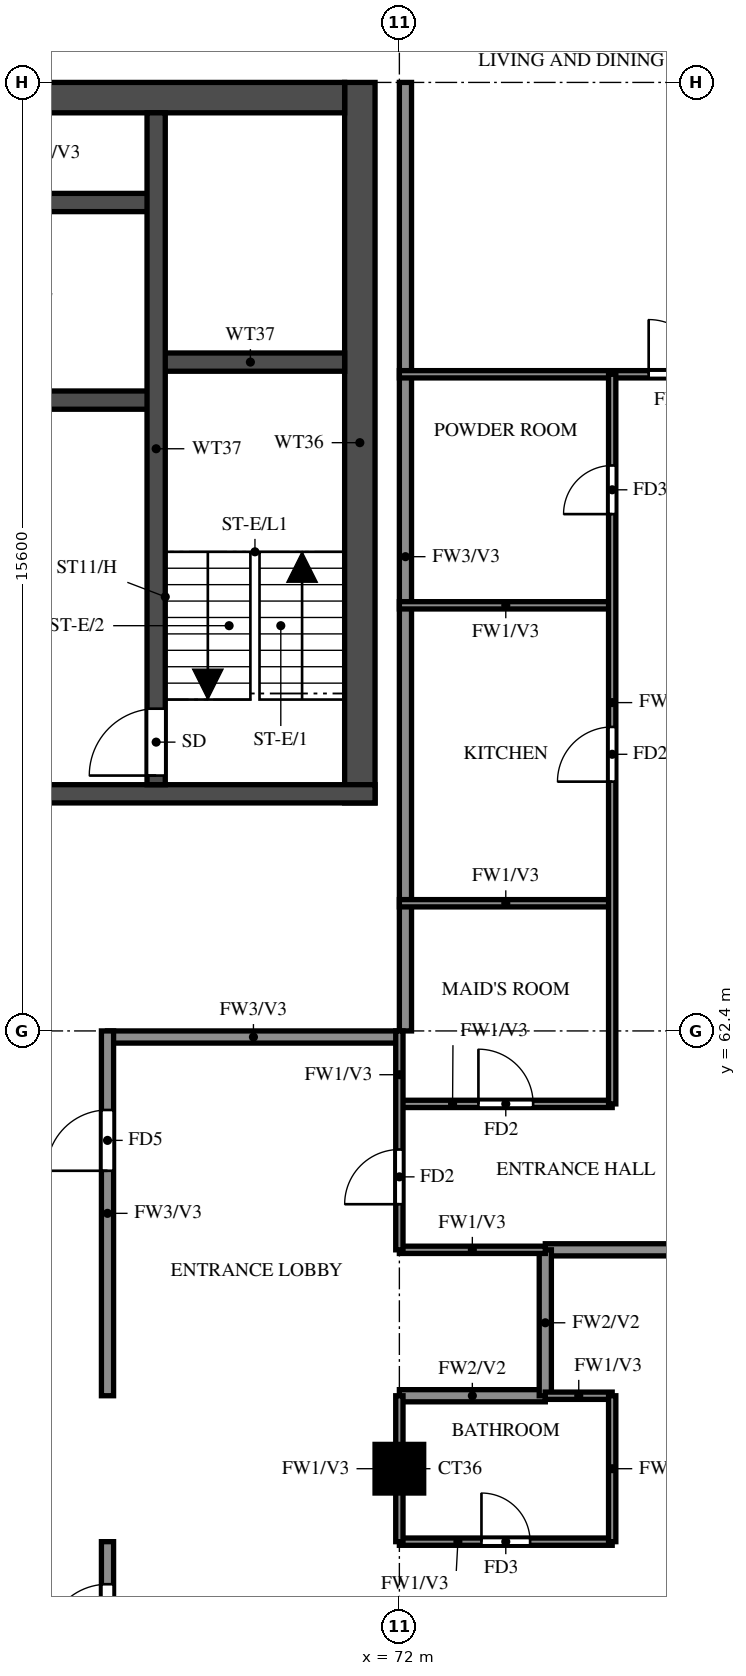
"""IFC4 building model, lengths in metres.
Left out: names, types, materials, properties, quantities, classifications, styles, units other than length and angle.
Written with IfcOpenShell. Run it as: python <this file> out.ifc"""

import sys

from ifc_helpers import new_model, si_unit, direction, frame, frame_2d, origin, origin_2d, place, context, subcontext, project, spatial, rectangle, extrude, source, transform, mapped, element, fill, save


model = new_model("IFC4")
c1 = context("Model", 3, precision=1e-05, world=origin(), true_north=direction((0.0, 1.0)))
c2 = subcontext(c1, "Body", "Model", "MODEL_VIEW")
j1 = project(units=[si_unit("LENGTHUNIT", "METRE"), si_unit("PLANEANGLEUNIT", "RADIAN")], contexts=[c1])
p1 = place(None, origin())
s1 = spatial("IfcSite", under=j1, at=p1, CompositionType="ELEMENT")
p2 = place(p1, origin())
s2 = spatial("IfcBuilding", under=s1, at=p2, CompositionType="ELEMENT")
p3 = place(p2, frame((0.0, 0.0, 243.0)))
s3 = spatial("IfcBuildingStorey", under=s2, at=p3, CompositionType="ELEMENT", Elevation=243.0)
m1 = source(origin(), c2, "Body", "SweptSolid", [
    extrude(rectangle(XDim=0.8, YDim=0.8, at=origin_2d()), origin(), (0.0, 0.0, 1.0), 3.22),
])
p4 = place(p3, frame((72.0, 55.2, 0.0), z_axis=(0.0, 0.0, 1.0), x_axis=(1.0, 0.0, 0.0)))
e1 = element("IfcColumn", 1, at=p4, inside=s3, PredefinedType="COLUMN", context=c2, shape_type="MappedRepresentation", body=[
    mapped(m1, transform((0.0, 0.0, 0.0))),
])
p5 = place(p3, frame((71.35, 66.15, 0.0), z_axis=(0.0, 0.0, 1.0), x_axis=(0.0, 1.0, 0.0)))
e2 = element("IfcWall", 2, at=p5, inside=s3, PredefinedType="SHEAR", context=c2, shape_type="SweptSolid", body=[
    extrude(rectangle(XDim=11.85, YDim=0.5, at=frame_2d((5.925, 0.0))), origin(), (0.0, 0.0, 1.0), 3.22),
])
p6 = place(p3, frame((29.7, 77.75, 0.0), z_axis=(0.0, 0.0, 1.0), x_axis=(1.0, 0.0, 0.0)))
e3 = element("IfcWall", 3, at=p6, inside=s3, PredefinedType="SHEAR", context=c2, shape_type="SweptSolid", body=[
    extrude(rectangle(XDim=41.4, YDim=0.5, at=frame_2d((20.7, 0.0))), origin(), (0.0, 0.0, 1.0), 3.22),
])
p7 = place(p3, frame((29.2, 66.3, 0.0), z_axis=(0.0, 0.0, 1.0), x_axis=(1.0, 0.0, 0.0)))
e4 = element("IfcWall", 4, at=p7, inside=s3, PredefinedType="SHEAR", context=c2, shape_type="SweptSolid", body=[
    extrude(rectangle(XDim=42.4, YDim=0.3, at=frame_2d((21.2, 0.0))), origin(), (0.0, 0.0, 1.0), 3.22),
])
p8 = place(p7, frame((1.425, 0.0, 0.0)))
e5 = element("IfcOpeningElement", 5, at=p8, cuts=e4, PredefinedType="OPENING", context=c2, shape_type="SweptSolid", body=[
    extrude(rectangle(XDim=1.1, YDim=2.1, at=frame_2d((0.55, 1.05))), frame((0.0, 0.16, 0.0), z_axis=(0.0, -1.0, 0.0), x_axis=(1.0, 0.0, 0.0)), (0.0, 0.0, 1.0), 0.32),
])
p9 = place(p7, frame((4.2, 0.0, 0.0)))
e6 = element("IfcOpeningElement", 6, at=p9, cuts=e4, PredefinedType="OPENING", context=c2, shape_type="SweptSolid", body=[
    extrude(rectangle(XDim=1.8, YDim=2.1, at=frame_2d((0.9, 1.05))), frame((0.0, 0.16, 0.0), z_axis=(0.0, -1.0, 0.0), x_axis=(1.0, 0.0, 0.0)), (0.0, 0.0, 1.0), 0.32),
])
p10 = place(p3, frame((32.8, 72.775, 0.0), z_axis=(0.0, 0.0, 1.0), x_axis=(1.0, 0.0, 0.0)))
e7 = element("IfcWall", 7, at=p10, inside=s3, PredefinedType="SHEAR", context=c2, shape_type="SweptSolid", body=[
    extrude(rectangle(XDim=35.2, YDim=0.3, at=frame_2d((17.6, 0.0))), origin(), (0.0, 0.0, 1.0), 3.22),
])
p11 = place(p10, frame((19.8, 0.0, 0.0)))
e8 = element("IfcOpeningElement", 8, at=p11, cuts=e7, PredefinedType="OPENING", context=c2, shape_type="SweptSolid", body=[
    extrude(rectangle(XDim=1.1, YDim=2.1, at=frame_2d((0.55, 1.05))), frame((0.0, 0.16, 0.0), z_axis=(0.0, -1.0, 0.0), x_axis=(1.0, 0.0, 0.0)), (0.0, 0.0, 1.0), 0.32),
])
p12 = place(p10, frame((27.725, 0.0, 0.0)))
e9 = element("IfcOpeningElement", 9, at=p12, cuts=e7, PredefinedType="OPENING", context=c2, shape_type="SweptSolid", body=[
    extrude(rectangle(XDim=1.1, YDim=2.1, at=frame_2d((0.55, 1.05))), frame((0.0, 0.16, 0.0), z_axis=(0.0, -1.0, 0.0), x_axis=(1.0, 0.0, 0.0)), (0.0, 0.0, 1.0), 0.32),
])
p13 = place(p10, frame((30.325, 0.0, 0.0)))
e10 = element("IfcOpeningElement", 10, at=p13, cuts=e7, PredefinedType="OPENING", context=c2, shape_type="SweptSolid", body=[
    extrude(rectangle(XDim=1.1, YDim=2.1, at=frame_2d((0.55, 1.05))), frame((0.0, 0.16, 0.0), z_axis=(0.0, -1.0, 0.0), x_axis=(1.0, 0.0, 0.0)), (0.0, 0.0, 1.0), 0.32),
])
p14 = place(p10, frame((3.825, 0.0, 0.0)))
e11 = element("IfcOpeningElement", 11, at=p14, cuts=e7, PredefinedType="OPENING", context=c2, shape_type="SweptSolid", body=[
    extrude(rectangle(XDim=1.1, YDim=2.1, at=frame_2d((0.55, 1.05))), frame((0.0, 0.16, 0.0), z_axis=(0.0, -1.0, 0.0), x_axis=(1.0, 0.0, 0.0)), (0.0, 0.0, 1.0), 0.32),
])
p15 = place(p10, frame((6.575, 0.0, 0.0)))
e12 = element("IfcOpeningElement", 12, at=p15, cuts=e7, PredefinedType="OPENING", context=c2, shape_type="SweptSolid", body=[
    extrude(rectangle(XDim=1.1, YDim=2.1, at=frame_2d((0.55, 1.05))), frame((0.0, 0.16, 0.0), z_axis=(0.0, -1.0, 0.0), x_axis=(1.0, 0.0, 0.0)), (0.0, 0.0, 1.0), 0.32),
])
p16 = place(p10, frame((9.325, 0.0, 0.0)))
e13 = element("IfcOpeningElement", 13, at=p16, cuts=e7, PredefinedType="OPENING", context=c2, shape_type="SweptSolid", body=[
    extrude(rectangle(XDim=1.1, YDim=2.1, at=frame_2d((0.55, 1.05))), frame((0.0, 0.16, 0.0), z_axis=(0.0, -1.0, 0.0), x_axis=(1.0, 0.0, 0.0)), (0.0, 0.0, 1.0), 0.32),
])
p17 = place(p10, frame((12.075, 0.0, 0.0)))
e14 = element("IfcOpeningElement", 14, at=p17, cuts=e7, PredefinedType="OPENING", context=c2, shape_type="SweptSolid", body=[
    extrude(rectangle(XDim=1.1, YDim=2.1, at=frame_2d((0.55, 1.05))), frame((0.0, 0.16, 0.0), z_axis=(0.0, -1.0, 0.0), x_axis=(1.0, 0.0, 0.0)), (0.0, 0.0, 1.0), 0.32),
])
p18 = place(p10, frame((14.825, 0.0, 0.0)))
e15 = element("IfcOpeningElement", 15, at=p18, cuts=e7, PredefinedType="OPENING", context=c2, shape_type="SweptSolid", body=[
    extrude(rectangle(XDim=1.1, YDim=2.1, at=frame_2d((0.55, 1.05))), frame((0.0, 0.16, 0.0), z_axis=(0.0, -1.0, 0.0), x_axis=(1.0, 0.0, 0.0)), (0.0, 0.0, 1.0), 0.32),
])
p19 = place(p10, frame((17.575, 0.0, 0.0)))
e16 = element("IfcOpeningElement", 16, at=p19, cuts=e7, PredefinedType="OPENING", context=c2, shape_type="SweptSolid", body=[
    extrude(rectangle(XDim=1.1, YDim=2.1, at=frame_2d((0.55, 1.05))), frame((0.0, 0.16, 0.0), z_axis=(0.0, -1.0, 0.0), x_axis=(1.0, 0.0, 0.0)), (0.0, 0.0, 1.0), 0.32),
])
p20 = place(p10, frame((0.95, 0.0, 0.0)))
e17 = element("IfcOpeningElement", 17, at=p20, cuts=e7, PredefinedType="OPENING", context=c2, shape_type="SweptSolid", body=[
    extrude(rectangle(XDim=1.1, YDim=2.1, at=frame_2d((0.55, 1.05))), frame((0.0, 0.16, 0.0), z_axis=(0.0, -1.0, 0.0), x_axis=(1.0, 0.0, 0.0)), (0.0, 0.0, 1.0), 0.32),
])
p21 = place(p3, frame((32.8, 76.025, 0.0), z_axis=(0.0, 0.0, 1.0), x_axis=(1.0, 0.0, 0.0)))
e18 = element("IfcWall", 18, at=p21, inside=s3, PredefinedType="SHEAR", context=c2, shape_type="SweptSolid", body=[
    extrude(rectangle(XDim=35.2, YDim=0.3, at=frame_2d((17.6, 0.0))), origin(), (0.0, 0.0, 1.0), 3.22),
])
p22 = place(p3, frame((68.0, 73.4, 0.0), z_axis=(0.0, 0.0, 1.0), x_axis=(1.0, 0.0, 0.0)))
e19 = element("IfcWall", 19, at=p22, inside=s3, PredefinedType="SHEAR", context=c2, shape_type="SweptSolid", body=[
    extrude(rectangle(XDim=3.1, YDim=0.3, at=frame_2d((1.55, 0.0))), origin(), (0.0, 0.0, 1.0), 3.22),
])
p23 = place(p3, frame((68.0, 66.45, 0.0), z_axis=(0.0, 0.0, 1.0), x_axis=(0.0, 1.0, 0.0)))
e20 = element("IfcWall", 20, at=p23, inside=s3, PredefinedType="SHEAR", context=c2, shape_type="SweptSolid", body=[
    extrude(rectangle(XDim=11.05, YDim=0.3, at=frame_2d((5.525, 0.0))), origin(), (0.0, 0.0, 1.0), 3.22),
])
p24 = place(p23, frame((0.15, 0.0, 0.0)))
e21 = element("IfcOpeningElement", 21, at=p24, cuts=e20, PredefinedType="OPENING", context=c2, shape_type="SweptSolid", body=[
    extrude(rectangle(XDim=1.1, YDim=2.1, at=frame_2d((0.55, 1.05))), frame((0.0, 0.16, 0.0), z_axis=(0.0, -1.0, 0.0), x_axis=(1.0, 0.0, 0.0)), (0.0, 0.0, 1.0), 0.32),
])
p25 = place(p3, frame((67.2, 62.3, 0.0), z_axis=(0.0, 0.0, 1.0), x_axis=(1.0, 0.0, 0.0)))
e22 = element("IfcWall", 22, at=p25, inside=s3, PredefinedType="SOLIDWALL", context=c2, shape_type="SweptSolid", body=[
    extrude(rectangle(XDim=4.8, YDim=0.2, at=frame_2d((2.4, 0.0))), origin(), (0.0, 0.0, 1.0), 3.22),
])
p26 = place(p3, frame((67.2, 45.6, 0.0), z_axis=(0.0, 0.0, 1.0), x_axis=(0.0, 1.0, 0.0)))
e23 = element("IfcWall", 23, at=p26, inside=s3, PredefinedType="SOLIDWALL", context=c2, shape_type="SweptSolid", body=[
    extrude(rectangle(XDim=8.4, YDim=0.2, at=frame_2d((4.2, 0.0))), origin(), (0.0, 0.0, 1.0), 3.22),
])
p27 = place(p26, frame((6.7, 0.0, 0.0)))
e24 = element("IfcOpeningElement", 24, at=p27, cuts=e23, PredefinedType="OPENING", context=c2, shape_type="SweptSolid", body=[
    extrude(rectangle(XDim=1.0, YDim=2.1, at=frame_2d((0.5, 1.05))), frame((0.0, 0.11, 0.0), z_axis=(0.0, -1.0, 0.0), x_axis=(1.0, 0.0, 0.0)), (0.0, 0.0, 1.0), 0.22),
])
p28 = place(p26, frame((0.7, 0.0, 0.0)))
e25 = element("IfcOpeningElement", 25, at=p28, cuts=e23, PredefinedType="OPENING", context=c2, shape_type="SweptSolid", body=[
    extrude(rectangle(XDim=1.0, YDim=2.1, at=frame_2d((0.5, 1.05))), frame((0.0, 0.11, 0.0), z_axis=(0.0, -1.0, 0.0), x_axis=(1.0, 0.0, 0.0)), (0.0, 0.0, 1.0), 0.22),
])
p29 = place(p3, frame((67.2, 56.4, 0.0), z_axis=(0.0, 0.0, 1.0), x_axis=(0.0, 1.0, 0.0)))
e26 = element("IfcWall", 26, at=p29, inside=s3, PredefinedType="SOLIDWALL", context=c2, shape_type="SweptSolid", body=[
    extrude(rectangle(XDim=6.0, YDim=0.2, at=frame_2d((3.0, 0.0))), origin(), (0.0, 0.0, 1.0), 3.22),
])
p30 = place(p29, frame((3.7, 0.0, 0.0)))
e27 = element("IfcOpeningElement", 27, at=p30, cuts=e26, PredefinedType="OPENING", context=c2, shape_type="SweptSolid", body=[
    extrude(rectangle(XDim=1.0, YDim=2.1, at=frame_2d((0.5, 1.05))), frame((0.0, 0.11, 0.0), z_axis=(0.0, -1.0, 0.0), x_axis=(1.0, 0.0, 0.0)), (0.0, 0.0, 1.0), 0.22),
])
p31 = place(p3, frame((72.1, 62.4, 0.0), z_axis=(0.0, 0.0, 1.0), x_axis=(0.0, 1.0, 0.0)))
e28 = element("IfcWall", 28, at=p31, inside=s3, PredefinedType="SOLIDWALL", context=c2, shape_type="SweptSolid", body=[
    extrude(rectangle(XDim=15.6, YDim=0.2, at=frame_2d((7.8, 0.0))), origin(), (0.0, 0.0, 1.0), 3.22),
])
p32 = place(p3, frame((72.0, 56.4, 0.0), z_axis=(0.0, 0.0, 1.0), x_axis=(1.0, 0.0, 0.0)))
e29 = element("IfcWall", 29, at=p32, inside=s3, PredefinedType="SOLIDWALL", context=c2, shape_type="SweptSolid", body=[
    extrude(rectangle(XDim=2.4, YDim=0.2, at=frame_2d((1.2, 0.0))), origin(), (0.0, 0.0, 1.0), 3.22),
])
p33 = place(p3, frame((74.4, 58.8, 0.0), z_axis=(0.0, 0.0, 1.0), x_axis=(1.0, 0.0, 0.0)))
e30 = element("IfcWall", 30, at=p33, inside=s3, PredefinedType="SOLIDWALL", context=c2, shape_type="SweptSolid", body=[
    extrude(rectangle(XDim=7.875, YDim=0.2, at=frame_2d((3.938, 0.0))), origin(), (0.0, 0.0, 1.0), 2.32),
])
p34 = place(p3, frame((74.4, 56.4, 0.0), z_axis=(0.0, 0.0, 1.0), x_axis=(0.0, 1.0, 0.0)))
e31 = element("IfcWall", 31, at=p34, inside=s3, PredefinedType="SOLIDWALL", context=c2, shape_type="SweptSolid", body=[
    extrude(rectangle(XDim=2.4, YDim=0.2, at=frame_2d((1.2, 0.0))), origin(), (0.0, 0.0, 1.0), 3.22),
])
p35 = place(p3, frame((72.0, 54.0, 0.0), z_axis=(0.0, 0.0, 1.0), x_axis=(1.0, 0.0, 0.0)))
e32 = element("IfcWall", 32, at=p35, inside=s3, PredefinedType="PARTITIONING", context=c2, shape_type="SweptSolid", body=[
    extrude(rectangle(XDim=3.5, YDim=0.12, at=frame_2d((1.75, 0.0))), origin(), (0.0, 0.0, 1.0), 3.22),
])
p36 = place(p35, frame((1.35, 0.0, 0.0)))
e33 = element("IfcOpeningElement", 33, at=p36, cuts=e32, PredefinedType="OPENING", context=c2, shape_type="SweptSolid", body=[
    extrude(rectangle(XDim=0.8, YDim=2.1, at=frame_2d((0.4, 1.05))), frame((0.0, 0.07, 0.0), z_axis=(0.0, -1.0, 0.0), x_axis=(1.0, 0.0, 0.0)), (0.0, 0.0, 1.0), 0.14),
])
p37 = place(p3, frame((74.4, 56.4, 0.0), z_axis=(0.0, 0.0, 1.0), x_axis=(1.0, 0.0, 0.0)))
e34 = element("IfcWall", 34, at=p37, inside=s3, PredefinedType="PARTITIONING", context=c2, shape_type="SweptSolid", body=[
    extrude(rectangle(XDim=1.1, YDim=0.12, at=frame_2d((0.55, 0.0))), origin(), (0.0, 0.0, 1.0), 3.22),
])
p38 = place(p3, frame((72.0, 58.8, 0.0), z_axis=(0.0, 0.0, 1.0), x_axis=(1.0, 0.0, 0.0)))
e35 = element("IfcWall", 35, at=p38, inside=s3, PredefinedType="PARTITIONING", context=c2, shape_type="SweptSolid", body=[
    extrude(rectangle(XDim=2.4, YDim=0.12, at=frame_2d((1.2, 0.0))), origin(), (0.0, 0.0, 1.0), 3.22),
])
p39 = place(p3, frame((72.0, 61.2, 0.0), z_axis=(0.0, 0.0, 1.0), x_axis=(1.0, 0.0, 0.0)))
e36 = element("IfcWall", 36, at=p39, inside=s3, PredefinedType="PARTITIONING", context=c2, shape_type="SweptSolid", body=[
    extrude(rectangle(XDim=3.5, YDim=0.12, at=frame_2d((1.75, 0.0))), origin(), (0.0, 0.0, 1.0), 3.22),
])
p40 = place(p39, frame((1.3, 0.0, 0.0)))
e37 = element("IfcOpeningElement", 37, at=p40, cuts=e36, PredefinedType="OPENING", context=c2, shape_type="SweptSolid", body=[
    extrude(rectangle(XDim=0.9, YDim=2.1, at=frame_2d((0.45, 1.05))), frame((0.0, 0.07, 0.0), z_axis=(0.0, -1.0, 0.0), x_axis=(1.0, 0.0, 0.0)), (0.0, 0.0, 1.0), 0.14),
])
for number, where, z_axis, x_axis in (
    (38, (72.0, 64.5, 0.0), (0.0, 0.0, 1.0), (1.0, 0.0, 0.0)),
    (39, (72.0, 69.4, 0.0), (0.0, 0.0, 1.0), (1.0, 0.0, 0.0)),
):
    element("IfcWall", number, at=place(p3, frame(where, z_axis=z_axis, x_axis=x_axis)), inside=s3, PredefinedType="PARTITIONING", context=c2, shape_type="SweptSolid", body=[
        extrude(rectangle(XDim=3.5, YDim=0.12, at=frame_2d((1.75, 0.0))), origin(), (0.0, 0.0, 1.0), 3.22),
    ])
p41 = place(p3, frame((72.0, 73.2, 0.0), z_axis=(0.0, 0.0, 1.0), x_axis=(1.0, 0.0, 0.0)))
e40 = element("IfcWall", 40, at=p41, inside=s3, PredefinedType="PARTITIONING", context=c2, shape_type="SweptSolid", body=[
    extrude(rectangle(XDim=10.275, YDim=0.12, at=frame_2d((5.137, 0.0))), origin(), (0.0, 0.0, 1.0), 2.32),
])
p42 = place(p41, frame((4.1, 0.0, 0.0)))
e41 = element("IfcOpeningElement", 41, at=p42, cuts=e40, PredefinedType="OPENING", context=c2, shape_type="SweptSolid", body=[
    extrude(rectangle(XDim=0.9, YDim=2.1, at=frame_2d((0.45, 1.05))), frame((0.0, 0.07, 0.0), z_axis=(0.0, -1.0, 0.0), x_axis=(1.0, 0.0, 0.0)), (0.0, 0.0, 1.0), 0.14),
])
p43 = place(p3, frame((72.0, 54.0, 0.0), z_axis=(0.0, 0.0, 1.0), x_axis=(0.0, 1.0, 0.0)))
e42 = element("IfcWall", 42, at=p43, inside=s3, PredefinedType="PARTITIONING", context=c2, shape_type="SweptSolid", body=[
    extrude(rectangle(XDim=2.4, YDim=0.12, at=frame_2d((1.2, 0.0))), origin(), (0.0, 0.0, 1.0), 3.22),
])
p44 = place(p3, frame((72.0, 58.8, 0.0), z_axis=(0.0, 0.0, 1.0), x_axis=(0.0, 1.0, 0.0)))
e43 = element("IfcWall", 43, at=p44, inside=s3, PredefinedType="PARTITIONING", context=c2, shape_type="SweptSolid", body=[
    extrude(rectangle(XDim=3.6, YDim=0.12, at=frame_2d((1.8, 0.0))), origin(), (0.0, 0.0, 1.0), 3.22),
])
p45 = place(p44, frame((0.75, 0.0, 0.0)))
e44 = element("IfcOpeningElement", 44, at=p45, cuts=e43, PredefinedType="OPENING", context=c2, shape_type="SweptSolid", body=[
    extrude(rectangle(XDim=0.9, YDim=2.1, at=frame_2d((0.45, 1.05))), frame((0.0, 0.07, 0.0), z_axis=(0.0, -1.0, 0.0), x_axis=(1.0, 0.0, 0.0)), (0.0, 0.0, 1.0), 0.14),
])
p46 = place(p3, frame((75.5, 54.0, 0.0), z_axis=(0.0, 0.0, 1.0), x_axis=(0.0, 1.0, 0.0)))
e45 = element("IfcWall", 45, at=p46, inside=s3, PredefinedType="PARTITIONING", context=c2, shape_type="SweptSolid", body=[
    extrude(rectangle(XDim=2.4, YDim=0.12, at=frame_2d((1.2, 0.0))), origin(), (0.0, 0.0, 1.0), 3.22),
])
p47 = place(p3, frame((75.5, 61.2, 0.0), z_axis=(0.0, 0.0, 1.0), x_axis=(0.0, 1.0, 0.0)))
e46 = element("IfcWall", 46, at=p47, inside=s3, PredefinedType="PARTITIONING", context=c2, shape_type="SweptSolid", body=[
    extrude(rectangle(XDim=12.0, YDim=0.12, at=frame_2d((6.0, 0.0))), origin(), (0.0, 0.0, 1.0), 3.22),
])
p48 = place(p47, frame((5.3, 0.0, 0.0)))
e47 = element("IfcOpeningElement", 47, at=p48, cuts=e46, PredefinedType="OPENING", context=c2, shape_type="SweptSolid", body=[
    extrude(rectangle(XDim=0.9, YDim=2.1, at=frame_2d((0.45, 1.05))), frame((0.0, 0.07, 0.0), z_axis=(0.0, -1.0, 0.0), x_axis=(1.0, 0.0, 0.0)), (0.0, 0.0, 1.0), 0.14),
])
p49 = place(p47, frame((9.7, 0.0, 0.0)))
e48 = element("IfcOpeningElement", 48, at=p49, cuts=e46, PredefinedType="OPENING", context=c2, shape_type="SweptSolid", body=[
    extrude(rectangle(XDim=0.8, YDim=2.1, at=frame_2d((0.4, 1.05))), frame((0.0, 0.07, 0.0), z_axis=(0.0, -1.0, 0.0), x_axis=(1.0, 0.0, 0.0)), (0.0, 0.0, 1.0), 0.14),
])
p50 = place(p24, origin())
e49 = element("IfcDoor", 49, at=p50, inside=s3, OperationType="SINGLE_SWING_RIGHT", PredefinedType="DOOR", context=c2, shape_type="SweptSolid", body=[
    extrude(rectangle(XDim=1.1, YDim=2.1, at=frame_2d((0.55, 1.05))), frame((0.0, 0.025, 0.0), z_axis=(0.0, -1.0, 0.0), x_axis=(1.0, 0.0, 0.0)), (0.0, 0.0, 1.0), 0.05),
])
fill(e21, e49)
p51 = place(p27, origin())
e50 = element("IfcDoor", 50, at=p51, inside=s3, OperationType="SINGLE_SWING_RIGHT", PredefinedType="DOOR", context=c2, shape_type="SweptSolid", body=[
    extrude(rectangle(XDim=1.0, YDim=2.1, at=frame_2d((0.5, 1.05))), frame((0.0, 0.025, 0.0), z_axis=(0.0, -1.0, 0.0), x_axis=(1.0, 0.0, 0.0)), (0.0, 0.0, 1.0), 0.05),
])
fill(e24, e50)
p52 = place(p36, origin())
e51 = element("IfcDoor", 51, at=p52, inside=s3, OperationType="SINGLE_SWING_LEFT", PredefinedType="DOOR", context=c2, shape_type="SweptSolid", body=[
    extrude(rectangle(XDim=0.8, YDim=2.1, at=frame_2d((0.4, 1.05))), frame((0.0, 0.025, 0.0), z_axis=(0.0, -1.0, 0.0), x_axis=(1.0, 0.0, 0.0)), (0.0, 0.0, 1.0), 0.05),
])
fill(e33, e51)
p53 = place(p45, origin())
e52 = element("IfcDoor", 52, at=p53, inside=s3, OperationType="SINGLE_SWING_LEFT", PredefinedType="DOOR", context=c2, shape_type="SweptSolid", body=[
    extrude(rectangle(XDim=0.9, YDim=2.1, at=frame_2d((0.45, 1.05))), frame((0.0, 0.025, 0.0), z_axis=(0.0, -1.0, 0.0), x_axis=(1.0, 0.0, 0.0)), (0.0, 0.0, 1.0), 0.05),
])
fill(e44, e52)
p54 = place(p30, origin())
e53 = element("IfcDoor", 53, at=p54, inside=s3, OperationType="SINGLE_SWING_RIGHT", PredefinedType="DOOR", context=c2, shape_type="SweptSolid", body=[
    extrude(rectangle(XDim=1.0, YDim=2.1, at=frame_2d((0.5, 1.05))), frame((0.0, 0.025, 0.0), z_axis=(0.0, -1.0, 0.0), x_axis=(1.0, 0.0, 0.0)), (0.0, 0.0, 1.0), 0.05),
])
fill(e27, e53)
p55 = place(p42, origin())
e54 = element("IfcDoor", 54, at=p55, inside=s3, OperationType="SINGLE_SWING_LEFT", PredefinedType="DOOR", context=c2, shape_type="SweptSolid", body=[
    extrude(rectangle(XDim=0.9, YDim=2.1, at=frame_2d((0.45, 1.05))), frame((0.0, 0.025, 0.0), z_axis=(0.0, -1.0, 0.0), x_axis=(1.0, 0.0, 0.0)), (0.0, 0.0, 1.0), 0.05),
])
fill(e41, e54)
p56 = place(p40, origin())
e55 = element("IfcDoor", 55, at=p56, inside=s3, OperationType="SINGLE_SWING_LEFT", PredefinedType="DOOR", context=c2, shape_type="SweptSolid", body=[
    extrude(rectangle(XDim=0.9, YDim=2.1, at=frame_2d((0.45, 1.05))), frame((0.0, 0.025, 0.0), z_axis=(0.0, -1.0, 0.0), x_axis=(1.0, 0.0, 0.0)), (0.0, 0.0, 1.0), 0.05),
])
fill(e37, e55)
p57 = place(p48, origin())
e56 = element("IfcDoor", 56, at=p57, inside=s3, OperationType="SINGLE_SWING_RIGHT", PredefinedType="DOOR", context=c2, shape_type="SweptSolid", body=[
    extrude(rectangle(XDim=0.9, YDim=2.1, at=frame_2d((0.45, 1.05))), frame((0.0, 0.025, 0.0), z_axis=(0.0, -1.0, 0.0), x_axis=(1.0, 0.0, 0.0)), (0.0, 0.0, 1.0), 0.05),
])
fill(e47, e56)
p58 = place(p49, origin())
e57 = element("IfcDoor", 57, at=p58, inside=s3, OperationType="SINGLE_SWING_LEFT", PredefinedType="DOOR", context=c2, shape_type="SweptSolid", body=[
    extrude(rectangle(XDim=0.8, YDim=2.1, at=frame_2d((0.4, 1.05))), frame((0.0, 0.025, 0.0), z_axis=(0.0, -1.0, 0.0), x_axis=(1.0, 0.0, 0.0)), (0.0, 0.0, 1.0), 0.05),
])
fill(e48, e57)
save(model, sys.argv[1])
